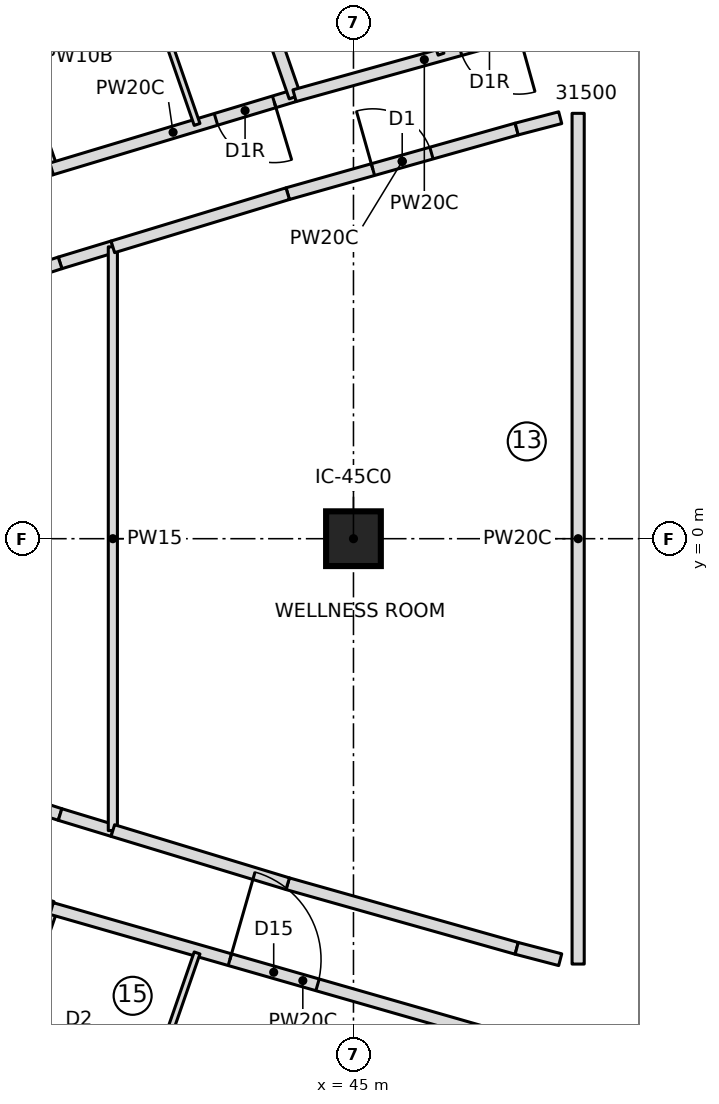
"""IFC4 building model, lengths in metres.
Left out: names, types, materials, properties, quantities, classifications, styles, units other than length and angle.
Written with IfcOpenShell. Run it as: python <this file> out.ifc"""

import sys

from ifc_helpers import new_model, si_unit, direction, frame, frame_2d, origin, origin_2d, place, context, subcontext, project, spatial, rectangle, extrude, element, fill, save


model = new_model("IFC4")
c1 = context("Model", 3, precision=1e-05, world=origin(), true_north=direction((0.0, 1.0)))
c2 = subcontext(c1, "Body", "Model", "MODEL_VIEW")
j1 = project(units=[si_unit("LENGTHUNIT", "METRE"), si_unit("PLANEANGLEUNIT", "RADIAN")], contexts=[c1])
p1 = place(None, origin())
s1 = spatial("IfcSite", under=j1, at=p1, CompositionType="ELEMENT")
p2 = place(p1, origin())
s2 = spatial("IfcBuilding", under=s1, at=p2, CompositionType="ELEMENT")
p3 = place(p2, frame((0.0, 0.0, 289.2)))
s3 = spatial("IfcBuildingStorey", under=s2, at=p3, CompositionType="ELEMENT", Elevation=289.2)
p4 = place(p3, frame((45.0, 0.0, 0.0), z_axis=(0.0, 0.0, 1.0), x_axis=(1.0, 0.0, 0.0)))
e1 = element("IfcColumn", 1, at=p4, inside=s3, PredefinedType="COLUMN", context=c2, shape_type="SweptSolid", body=[
    extrude(rectangle(XDim=0.9, YDim=0.9, at=origin_2d()), origin(), (0.0, 0.0, 1.0), 3.55),
])
p5 = place(p3, frame((40.035, 6.083, 0.0), z_axis=(0.0, 0.0, 1.0), x_axis=(-0.951196378796, -0.308586209941, 0.0)))
e2 = element("IfcWall", 2, at=p5, inside=s3, PredefinedType="PARTITIONING", context=c2, shape_type="SweptSolid", body=[
    extrude(rectangle(XDim=4.175, YDim=0.2, at=frame_2d((2.087, 0.0))), origin(), (0.0, 0.0, 1.0), 3.25),
])
p6 = place(p5, frame((0.35, 0.0, 0.0)))
e3 = element("IfcOpeningElement", 3, at=p6, cuts=e2, PredefinedType="OPENING", context=c2, shape_type="SweptSolid", body=[
    extrude(rectangle(XDim=1.0, YDim=2.1, at=frame_2d((0.5, 1.05))), frame((0.0, 0.11, 0.0), z_axis=(0.0, -1.0, 0.0), x_axis=(1.0, 0.0, 0.0)), (0.0, 0.0, 1.0), 0.22),
])
p7 = place(p3, frame((40.042, 6.064, 0.0), z_axis=(0.0, 0.0, 1.0), x_axis=(-0.327710853631, 0.944778067279, 0.0)))
e4 = element("IfcWall", 4, at=p7, inside=s3, PredefinedType="PARTITIONING", context=c2, shape_type="SweptSolid", body=[
    extrude(rectangle(XDim=9.707, YDim=0.2, at=frame_2d((4.854, 0.0))), origin(), (0.0, 0.0, 1.0), 3.25),
])
p8 = place(p3, frame((44.031, 7.286, 0.0), z_axis=(0.0, 0.0, 1.0), x_axis=(-0.957521424208, -0.288362137222, 0.0)))
e5 = element("IfcWall", 5, at=p8, inside=s3, PredefinedType="PARTITIONING", context=c2, shape_type="SweptSolid", body=[
    extrude(rectangle(XDim=4.173, YDim=0.2, at=frame_2d((2.086, 0.0))), origin(), (0.0, 0.0, 1.0), 3.25),
])
p9 = place(p8, frame((0.35, 0.0, 0.0)))
e6 = element("IfcOpeningElement", 6, at=p9, cuts=e5, PredefinedType="OPENING", context=c2, shape_type="SweptSolid", body=[
    extrude(rectangle(XDim=1.0, YDim=2.1, at=frame_2d((0.5, 1.05))), frame((0.0, 0.11, 0.0), z_axis=(0.0, -1.0, 0.0), x_axis=(1.0, 0.0, 0.0)), (0.0, 0.0, 1.0), 0.22),
])
p10 = place(p3, frame((41.681, 8.966, 0.0), z_axis=(0.0, 0.0, 1.0), x_axis=(0.327743427431, -0.944766767925, 0.0)))
e7 = element("IfcWall", 7, at=p10, inside=s3, PredefinedType="PARTITIONING", context=c2, shape_type="SweptSolid", body=[
    extrude(rectangle(XDim=2.279, YDim=0.1, at=frame_2d((1.139, 0.0))), origin(), (0.0, 0.0, 1.0), 3.25),
])
p11 = place(p3, frame((44.038, 7.267, 0.0), z_axis=(0.0, 0.0, 1.0), x_axis=(-0.327714576096, 0.944776776077, 0.0)))
e8 = element("IfcWall", 8, at=p11, inside=s3, PredefinedType="PARTITIONING", context=c2, shape_type="SweptSolid", body=[
    extrude(rectangle(XDim=9.717, YDim=0.2, at=frame_2d((4.858, 0.0))), origin(), (0.0, 0.0, 1.0), 3.25),
])
p12 = place(p3, frame((48.299, 8.473, 0.0), z_axis=(0.0, 0.0, 1.0), x_axis=(-0.96343417102, -0.267945140115, 0.0)))
e9 = element("IfcWall", 9, at=p12, inside=s3, PredefinedType="PARTITIONING", context=c2, shape_type="SweptSolid", body=[
    extrude(rectangle(XDim=4.43, YDim=0.2, at=frame_2d((2.215, 0.0))), origin(), (0.0, 0.0, 1.0), 3.25),
])
p13 = place(p12, frame((0.603, 0.0, 0.0)))
e10 = element("IfcOpeningElement", 10, at=p13, cuts=e9, PredefinedType="OPENING", context=c2, shape_type="SweptSolid", body=[
    extrude(rectangle(XDim=1.0, YDim=2.1, at=frame_2d((0.5, 1.05))), frame((0.0, 0.11, 0.0), z_axis=(0.0, -1.0, 0.0), x_axis=(1.0, 0.0, 0.0)), (0.0, 0.0, 1.0), 0.22),
])
p14 = place(p3, frame((45.693, 10.124, 0.0), z_axis=(0.0, 0.0, 1.0), x_axis=(0.327764902685, -0.944759317799, 0.0)))
e11 = element("IfcWall", 11, at=p14, inside=s3, PredefinedType="PARTITIONING", context=c2, shape_type="SweptSolid", body=[
    extrude(rectangle(XDim=2.281, YDim=0.1, at=frame_2d((1.14, 0.0))), origin(), (0.0, 0.0, 1.0), 3.25),
])
p15 = place(p3, frame((26.85, -1.423, 0.0), z_axis=(0.0, 0.0, 1.0), x_axis=(0.943328585164, -0.331860182022, 0.0)))
e12 = element("IfcWall", 12, at=p15, inside=s3, PredefinedType="PARTITIONING", context=c2, shape_type="SweptSolid", body=[
    extrude(rectangle(XDim=13.984, YDim=0.2, at=frame_2d((6.992, 0.0))), origin(), (0.0, 0.0, 1.0), 3.25),
])
p16 = place(p15, frame((3.05, 0.0, 0.0)))
e13 = element("IfcOpeningElement", 13, at=p16, cuts=e12, PredefinedType="OPENING", context=c2, shape_type="SweptSolid", body=[
    extrude(rectangle(XDim=1.5, YDim=2.1, at=frame_2d((0.75, 1.05))), frame((0.0, 0.11, 0.0), z_axis=(0.0, -1.0, 0.0), x_axis=(1.0, 0.0, 0.0)), (0.0, 0.0, 1.0), 0.22),
])
p17 = place(p3, frame((36.861, -15.235, 0.0), z_axis=(0.0, 0.0, 1.0), x_axis=(0.327710853631, 0.944778067279, 0.0)))
e14 = element("IfcWall", 14, at=p17, inside=s3, PredefinedType="PARTITIONING", context=c2, shape_type="SweptSolid", body=[
    extrude(rectangle(XDim=9.707, YDim=0.2, at=frame_2d((4.854, 0.0))), origin(), (0.0, 0.0, 1.0), 3.25),
])
p18 = place(p3, frame((40.035, -6.083, 0.0), z_axis=(0.0, 0.0, 1.0), x_axis=(0.961195333593, -0.275868683759, 0.0)))
e15 = element("IfcWall", 15, at=p18, inside=s3, PredefinedType="PARTITIONING", context=c2, shape_type="SweptSolid", body=[
    extrude(rectangle(XDim=8.597, YDim=0.2, at=frame_2d((4.298, 0.0))), origin(), (0.0, 0.0, 1.0), 3.25),
])
p19 = place(p18, frame((3.05, 0.0, 0.0)))
e16 = element("IfcOpeningElement", 16, at=p19, cuts=e15, PredefinedType="OPENING", context=c2, shape_type="SweptSolid", body=[
    extrude(rectangle(XDim=1.5, YDim=2.1, at=frame_2d((0.75, 1.05))), frame((0.0, 0.11, 0.0), z_axis=(0.0, -1.0, 0.0), x_axis=(1.0, 0.0, 0.0)), (0.0, 0.0, 1.0), 0.22),
])
p20 = place(p3, frame((42.428, -6.813, 0.0), z_axis=(0.0, 0.0, 1.0), x_axis=(-0.327743427431, -0.944766767925, 0.0)))
e17 = element("IfcWall", 17, at=p20, inside=s3, PredefinedType="PARTITIONING", context=c2, shape_type="SweptSolid", body=[
    extrude(rectangle(XDim=2.279, YDim=0.1, at=frame_2d((1.139, 0.0))), origin(), (0.0, 0.0, 1.0), 3.25),
])
p21 = place(p3, frame((40.175, -4.536, 0.0), z_axis=(0.0, 0.0, 1.0), x_axis=(-0.950709849021, 0.310081897206, 0.0)))
e18 = element("IfcWall", 18, at=p21, inside=s3, PredefinedType="PARTITIONING", context=c2, shape_type="SweptSolid", body=[
    extrude(rectangle(XDim=3.913, YDim=0.2, at=frame_2d((1.957, 0.0))), origin(), (0.0, 0.0, 1.0), 3.25),
])
p22 = place(p21, frame((1.457, 0.0, 0.0)))
e19 = element("IfcOpeningElement", 19, at=p22, cuts=e18, PredefinedType="OPENING", context=c2, shape_type="SweptSolid", body=[
    extrude(rectangle(XDim=1.0, YDim=2.1, at=frame_2d((0.5, 1.05))), frame((0.0, 0.11, 0.0), z_axis=(0.0, -1.0, 0.0), x_axis=(1.0, 0.0, 0.0)), (0.0, 0.0, 1.0), 0.22),
])
for number, where, z_axis, x_axis in (
    (20, (40.175, 4.536, 0.0), (0.0, 0.0, 1.0), (0.957, 0.291, 0.0)),
    (21, (41.043, -4.8, 0.0), (0.0, 0.0, 1.0), (-0.957, 0.291, 0.0)),
):
    element("IfcWall", number, at=place(p3, frame(where, z_axis=z_axis, x_axis=x_axis)), inside=s3, PredefinedType="PARTITIONING", context=c2, shape_type="SweptSolid", body=[
        extrude(rectangle(XDim=0.907, YDim=0.2, at=frame_2d((0.454, 0.0))), origin(), (0.0, 0.0, 1.0), 3.25),
    ])
p23 = place(p3, frame((36.455, 3.323, 0.0), z_axis=(0.0, 0.0, 1.0), x_axis=(0.950709849021, 0.310081897206, 0.0)))
e22 = element("IfcWall", 22, at=p23, inside=s3, PredefinedType="PARTITIONING", context=c2, shape_type="SweptSolid", body=[
    extrude(rectangle(XDim=3.913, YDim=0.2, at=frame_2d((1.957, 0.0))), origin(), (0.0, 0.0, 1.0), 3.25),
])
p24 = place(p3, frame((41.043, -4.8, 0.0), z_axis=(0.0, 0.0, 1.0), x_axis=(0.0, 1.0, 0.0)))
e23 = element("IfcWall", 23, at=p24, inside=s3, PredefinedType="PARTITIONING", context=c2, shape_type="SweptSolid", body=[
    extrude(rectangle(XDim=9.6, YDim=0.15, at=frame_2d((4.8, 0.0))), origin(), (0.0, 0.0, 1.0), 3.25),
])
p25 = place(p3, frame((43.918, 5.675, 0.0), z_axis=(0.0, 0.0, 1.0), x_axis=(0.962411212211, 0.271596499628, 0.0)))
e24 = element("IfcWall", 24, at=p25, inside=s3, PredefinedType="PARTITIONING", context=c2, shape_type="SweptSolid", body=[
    extrude(rectangle(XDim=3.913, YDim=0.2, at=frame_2d((1.957, 0.0))), origin(), (0.0, 0.0, 1.0), 3.25),
])
p26 = place(p25, frame((1.457, 0.0, 0.0)))
e25 = element("IfcOpeningElement", 25, at=p26, cuts=e24, PredefinedType="OPENING", context=c2, shape_type="SweptSolid", body=[
    extrude(rectangle(XDim=1.0, YDim=2.1, at=frame_2d((0.5, 1.05))), frame((0.0, 0.11, 0.0), z_axis=(0.0, -1.0, 0.0), x_axis=(1.0, 0.0, 0.0)), (0.0, 0.0, 1.0), 0.22),
])
p27 = place(p3, frame((47.684, -6.738, 0.0), z_axis=(0.0, 0.0, 1.0), x_axis=(-0.962411212211, 0.271596499628, 0.0)))
e26 = element("IfcWall", 26, at=p27, inside=s3, PredefinedType="PARTITIONING", context=c2, shape_type="SweptSolid", body=[
    extrude(rectangle(XDim=3.913, YDim=0.2, at=frame_2d((1.957, 0.0))), origin(), (0.0, 0.0, 1.0), 3.25),
])
for number, where, z_axis, x_axis in (
    (27, (43.918, -5.675, 0.0), (0.0, 0.0, 1.0), (-0.957, 0.291, 0.0)),
    (28, (41.043, 4.8, 0.0), (0.0, 0.0, 1.0), (0.957, 0.291, 0.0)),
):
    element("IfcWall", number, at=place(p3, frame(where, z_axis=z_axis, x_axis=x_axis)), inside=s3, PredefinedType="PARTITIONING", context=c2, shape_type="SweptSolid", body=[
        extrude(rectangle(XDim=3.006, YDim=0.2, at=frame_2d((1.503, 0.0))), origin(), (0.0, 0.0, 1.0), 3.25),
    ])
for number, where, z_axis, x_axis in (
    (29, (47.684, 6.738, 0.0), (0.0, 0.0, 1.0), (0.968, 0.253, 0.0)),
    (30, (48.4, -6.924, 0.0), (0.0, 0.0, 1.0), (-0.968, 0.253, 0.0)),
):
    element("IfcWall", number, at=place(p3, frame(where, z_axis=z_axis, x_axis=x_axis)), inside=s3, PredefinedType="PARTITIONING", context=c2, shape_type="SweptSolid", body=[
        extrude(rectangle(XDim=0.74, YDim=0.2, at=frame_2d((0.37, 0.0))), origin(), (0.0, 0.0, 1.0), 3.25),
    ])
p28 = place(p3, frame((48.695, 6.996, 0.0), z_axis=(0.0, 0.0, 1.0), x_axis=(0.0, -1.0, 0.0)))
e31 = element("IfcWall", 31, at=p28, inside=s3, PredefinedType="PARTITIONING", context=c2, shape_type="SweptSolid", body=[
    extrude(rectangle(XDim=13.992, YDim=0.2, at=frame_2d((6.996, 0.0))), origin(), (0.0, 0.0, 1.0), 3.25),
])
p29 = place(p9, origin())
e32 = element("IfcDoor", 32, at=p29, inside=s3, OperationType="SINGLE_SWING_RIGHT", PredefinedType="DOOR", context=c2, shape_type="SweptSolid", body=[
    extrude(rectangle(XDim=1.0, YDim=2.1, at=frame_2d((0.5, 1.05))), frame((0.0, 0.025, 0.0), z_axis=(0.0, -1.0, 0.0), x_axis=(1.0, 0.0, 0.0)), (0.0, 0.0, 1.0), 0.05),
])
fill(e6, e32)
p30 = place(p19, origin())
e33 = element("IfcDoor", 33, at=p30, inside=s3, OperationType="DOUBLE_DOOR_SINGLE_SWING", PredefinedType="DOOR", context=c2, shape_type="SweptSolid", body=[
    extrude(rectangle(XDim=1.5, YDim=2.1, at=frame_2d((0.75, 1.05))), frame((0.0, 0.025, 0.0), z_axis=(0.0, -1.0, 0.0), x_axis=(1.0, 0.0, 0.0)), (0.0, 0.0, 1.0), 0.05),
])
fill(e16, e33)
p31 = place(p26, origin())
e34 = element("IfcDoor", 34, at=p31, inside=s3, OperationType="SINGLE_SWING_LEFT", PredefinedType="DOOR", context=c2, shape_type="SweptSolid", body=[
    extrude(rectangle(XDim=1.0, YDim=2.1, at=frame_2d((0.5, 1.05))), frame((0.0, 0.025, 0.0), z_axis=(0.0, -1.0, 0.0), x_axis=(1.0, 0.0, 0.0)), (0.0, 0.0, 1.0), 0.05),
])
fill(e25, e34)
save(model, sys.argv[1])
